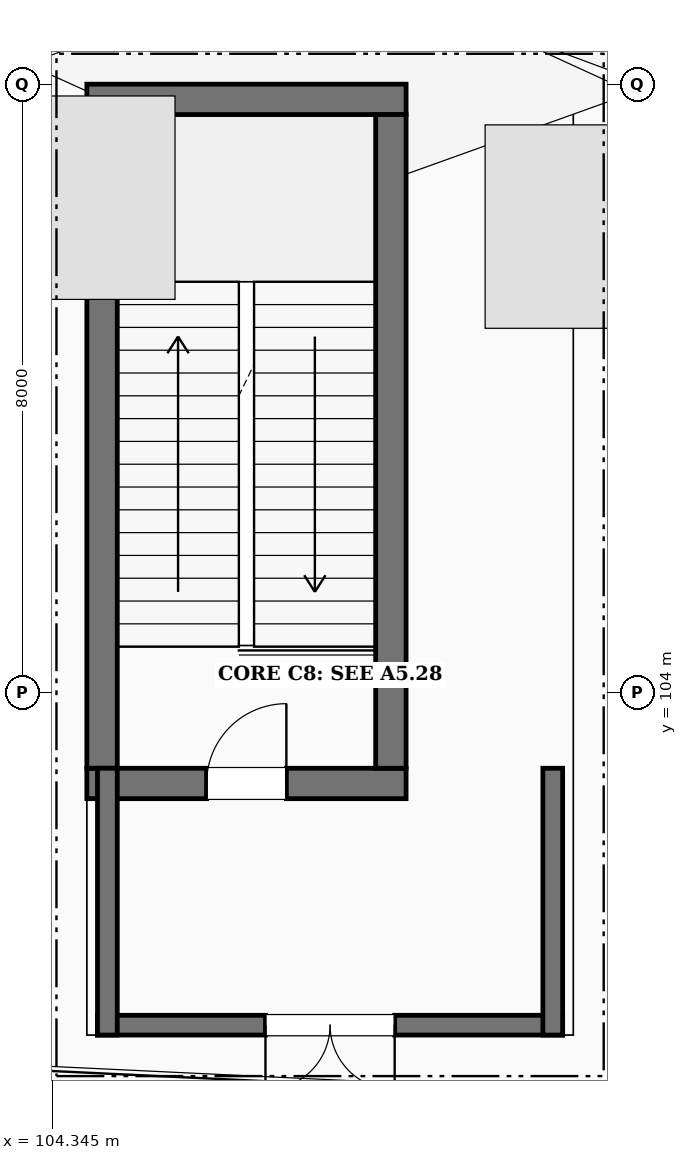
"""IFC4 building model, lengths in metres.
Left out: names, types, materials, properties, quantities, classifications, styles, units other than length and angle.
Written with IfcOpenShell. Run it as: python <this file> out.ifc"""

import sys

from ifc_helpers import new_model, si_unit, direction, frame, frame_2d, origin, place, context, subcontext, project, spatial, rectangle, extrude, element, fill, save


model = new_model("IFC4")
c1 = context("Model", 3, precision=1e-05, world=origin(), true_north=direction((0.0, 1.0)))
c2 = subcontext(c1, "Body", "Model", "MODEL_VIEW")
j1 = project(units=[si_unit("LENGTHUNIT", "METRE"), si_unit("PLANEANGLEUNIT", "RADIAN")], contexts=[c1])
p1 = place(None, origin())
s1 = spatial("IfcSite", under=j1, at=p1, CompositionType="ELEMENT")
p2 = place(p1, origin())
s2 = spatial("IfcBuilding", under=s1, at=p2, CompositionType="ELEMENT")
p3 = place(p2, frame((0.0, 0.0, 10.8)))
s3 = spatial("IfcBuildingStorey", under=s2, at=p3, CompositionType="ELEMENT", Elevation=10.8)
p4 = place(p3, frame((104.8, 102.8, 0.0), z_axis=(0.0, 0.0, 1.0), x_axis=(1.0, 0.0, 0.0)))
e1 = element("IfcWall", 1, at=p4, inside=s3, PredefinedType="SHEAR", context=c2, shape_type="SweptSolid", body=[
    extrude(rectangle(XDim=4.2, YDim=0.4, at=frame_2d((2.1, 0.0))), origin(), (0.0, 0.0, 1.0), 2.65),
])
p5 = place(p4, frame((1.575, 0.0, 0.0)))
e2 = element("IfcOpeningElement", 2, at=p5, cuts=e1, PredefinedType="OPENING", context=c2, shape_type="SweptSolid", body=[
    extrude(rectangle(XDim=1.05, YDim=2.15, at=frame_2d((0.525, 1.075))), frame((0.0, 0.21, 0.0), z_axis=(0.0, -1.0, 0.0), x_axis=(1.0, 0.0, 0.0)), (0.0, 0.0, 1.0), 0.42),
])
p6 = place(p3, frame((104.8, 111.8, 0.0), z_axis=(0.0, 0.0, 1.0), x_axis=(1.0, 0.0, 0.0)))
e3 = element("IfcWall", 3, at=p6, inside=s3, PredefinedType="SHEAR", context=c2, shape_type="SweptSolid", body=[
    extrude(rectangle(XDim=4.2, YDim=0.4, at=frame_2d((2.1, 0.0))), origin(), (0.0, 0.0, 1.0), 2.65),
])
for number, where, z_axis, x_axis in (
    (4, (105.0, 103.0, 0.0), (0.0, 0.0, 1.0), (0.0, 1.0, 0.0)),
    (5, (108.8, 103.0, 0.0), (0.0, 0.0, 1.0), (0.0, 1.0, 0.0)),
):
    element("IfcWall", number, at=place(p3, frame(where, z_axis=z_axis, x_axis=x_axis)), inside=s3, PredefinedType="SHEAR", context=c2, shape_type="SweptSolid", body=[
        extrude(rectangle(XDim=8.6, YDim=0.4, at=frame_2d((4.3, 0.0))), origin(), (0.0, 0.0, 1.0), 2.65),
    ])
p7 = place(p3, frame((111.06, 99.62, 0.0), z_axis=(0.0, 0.0, 1.0), x_axis=(-1.0, 0.0, 0.0)))
e6 = element("IfcWall", 6, at=p7, inside=s3, PredefinedType="SHEAR", context=c2, shape_type="SweptSolid", body=[
    extrude(rectangle(XDim=6.12, YDim=0.26, at=frame_2d((3.06, 0.0))), origin(), (0.0, 0.0, 1.0), 2.65),
])
p8 = place(p7, frame((2.21, 0.0, 0.0)))
e7 = element("IfcOpeningElement", 7, at=p8, cuts=e6, PredefinedType="OPENING", context=c2, shape_type="SweptSolid", body=[
    extrude(rectangle(XDim=1.7, YDim=2.2, at=frame_2d((0.85, 1.1))), frame((0.0, 0.14, 0.0), z_axis=(0.0, -1.0, 0.0), x_axis=(1.0, 0.0, 0.0)), (0.0, 0.0, 1.0), 0.28),
])
for number, where, z_axis, x_axis in (
    (8, (105.07, 99.49, 0.0), (0.0, 0.0, 1.0), (0.0, 1.0, 0.0)),
    (9, (110.93, 99.49, 0.0), (0.0, 0.0, 1.0), (0.0, 1.0, 0.0)),
):
    element("IfcWall", number, at=place(p3, frame(where, z_axis=z_axis, x_axis=x_axis)), inside=s3, PredefinedType="SHEAR", context=c2, shape_type="SweptSolid", body=[
        extrude(rectangle(XDim=3.51, YDim=0.26, at=frame_2d((1.755, 0.0))), origin(), (0.0, 0.0, 1.0), 2.65),
    ])
p9 = place(p5, origin())
e10 = element("IfcDoor", 10, at=p9, inside=s3, OperationType="SINGLE_SWING_RIGHT", PredefinedType="DOOR", context=c2, shape_type="SweptSolid", body=[
    extrude(rectangle(XDim=1.05, YDim=2.15, at=frame_2d((0.525, 1.075))), frame((0.0, 0.025, 0.0), z_axis=(0.0, -1.0, 0.0), x_axis=(1.0, 0.0, 0.0)), (0.0, 0.0, 1.0), 0.05),
])
fill(e2, e10)
p10 = place(p8, origin())
e11 = element("IfcDoor", 11, at=p10, inside=s3, OperationType="DOUBLE_DOOR_SINGLE_SWING", PredefinedType="DOOR", context=c2, shape_type="SweptSolid", body=[
    extrude(rectangle(XDim=1.7, YDim=2.2, at=frame_2d((0.85, 1.1))), frame((0.0, 0.025, 0.0), z_axis=(0.0, -1.0, 0.0), x_axis=(1.0, 0.0, 0.0)), (0.0, 0.0, 1.0), 0.05),
])
fill(e7, e11)
save(model, sys.argv[1])
